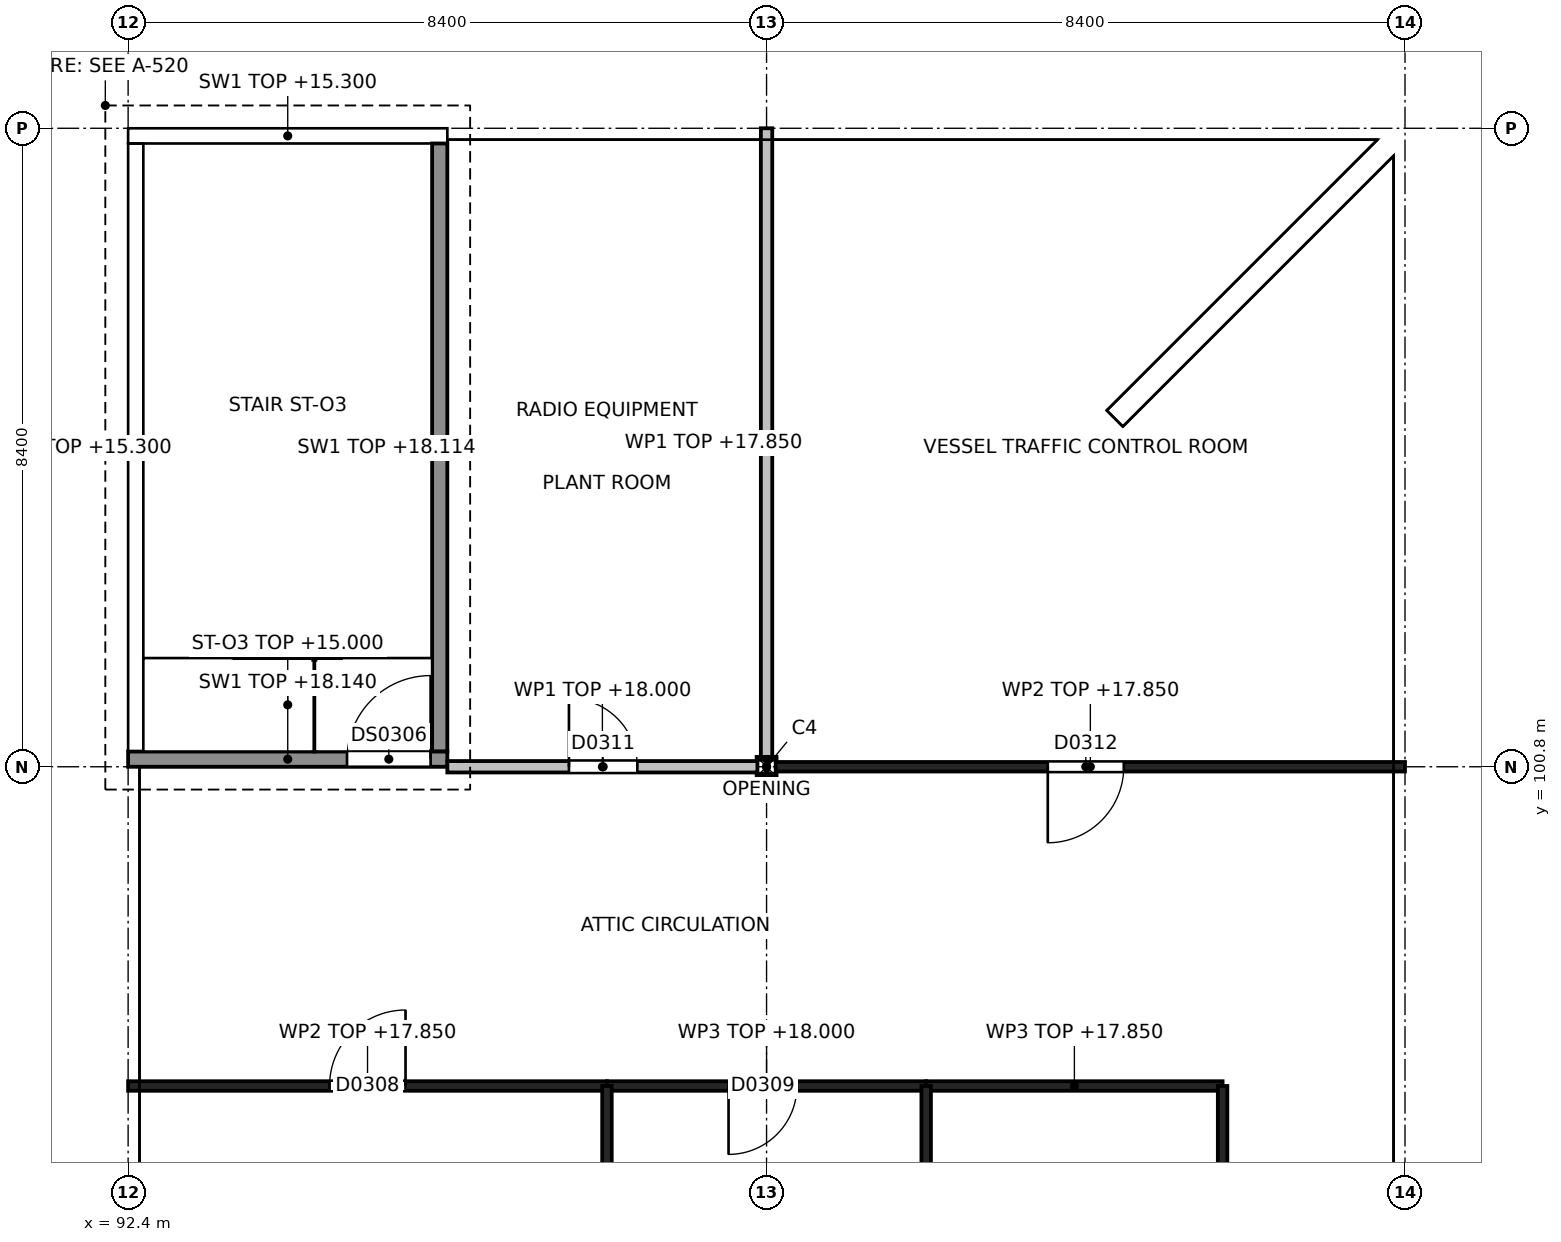
"""IFC4 building model, lengths in metres.
Left out: names, types, materials, properties, quantities, classifications, styles, units other than length and angle.
Written with IfcOpenShell. Run it as: python <this file> out.ifc"""

import sys

from ifc_helpers import new_model, si_unit, direction, frame, frame_2d, origin, origin_2d, place, context, subcontext, project, spatial, polyline, rectangle, i_section, outline, extrude, element, fill, save


model = new_model("IFC4")
c1 = context("Model", 3, precision=1e-05, world=origin(), true_north=direction((0.0, 1.0)))
c2 = subcontext(c1, "Body", "Model", "MODEL_VIEW")
j1 = project(units=[si_unit("LENGTHUNIT", "METRE"), si_unit("PLANEANGLEUNIT", "RADIAN")], contexts=[c1])
p1 = place(None, origin())
s1 = spatial("IfcSite", under=j1, at=p1, CompositionType="ELEMENT")
p2 = place(p1, origin())
s2 = spatial("IfcBuilding", under=s1, at=p2, CompositionType="ELEMENT")
p3 = place(p2, frame((0.0, 0.0, 15.0)))
s3 = spatial("IfcBuildingStorey", under=s2, at=p3, CompositionType="ELEMENT", Elevation=15.0)
p4 = place(p3, frame((100.8, 100.8, 0.0), z_axis=(0.0, 0.0, 1.0), x_axis=(1.0, 0.0, 0.0)))
e1 = element("IfcColumn", 1, at=p4, inside=s3, PredefinedType="COLUMN", context=c2, shape_type="SweptSolid", body=[
    extrude(i_section(OverallWidth=0.24, OverallDepth=0.24, WebThickness=0.01, FlangeThickness=0.017, at=origin_2d()), origin(), (0.0, 0.0, 1.0), 3.31),
])
p5 = place(p3, frame((92.4, 100.9, 0.0), z_axis=(0.0, 0.0, 1.0), x_axis=(1.0, 0.0, 0.0)))
e2 = element("IfcWall", 2, at=p5, inside=s3, PredefinedType="SHEAR", context=c2, shape_type="SweptSolid", body=[
    extrude(outline(polyline([(0.0, 0.0), (4.2, 0.0), (4.2, 3.14), (3.953, 2.755), (3.706, 2.755), (3.459, 2.917), (0.247, 0.393), (0.0, 0.3), (0.0, 0.0)])), frame((0.0, 0.1, 0.0), z_axis=(0.0, -1.0, 0.0), x_axis=(1.0, 0.0, 0.0)), (0.0, 0.0, 1.0), 0.2),
])
p6 = place(p5, frame((2.88, 0.0, 0.0)))
e3 = element("IfcOpeningElement", 3, at=p6, cuts=e2, PredefinedType="OPENING", context=c2, shape_type="SweptSolid", body=[
    extrude(rectangle(XDim=1.1, YDim=2.1, at=frame_2d((0.55, 1.05))), frame((0.0, 0.1, 0.0), z_axis=(0.0, -1.0, 0.0), x_axis=(1.0, 0.0, 0.0)), (0.0, 0.0, 1.0), 0.2),
])
p7 = place(p3, frame((92.4, 109.1, 0.0), z_axis=(0.0, 0.0, 1.0), x_axis=(1.0, 0.0, 0.0)))
e4 = element("IfcWall", 4, at=p7, inside=s3, PredefinedType="SHEAR", context=c2, shape_type="SweptSolid", body=[
    extrude(outline(polyline([(0.0, 0.0), (4.2, 0.0), (4.2, 0.3), (0.0, 0.3), (0.0, 0.0)])), frame((0.0, 0.1, 0.0), z_axis=(0.0, -1.0, 0.0), x_axis=(1.0, 0.0, 0.0)), (0.0, 0.0, 1.0), 0.2),
])
p8 = place(p3, frame((92.5, 101.0, 0.0), z_axis=(0.0, 0.0, 1.0), x_axis=(0.0, 1.0, 0.0)))
e5 = element("IfcWall", 5, at=p8, inside=s3, PredefinedType="SHEAR", context=c2, shape_type="SweptSolid", body=[
    extrude(outline(polyline([(0.0, 0.0), (8.0, 0.0), (8.0, 0.3), (0.0, 0.3), (0.0, 0.0)])), frame((0.0, 0.1, 0.0), z_axis=(0.0, -1.0, 0.0), x_axis=(1.0, 0.0, 0.0)), (0.0, 0.0, 1.0), 0.2),
])
p9 = place(p3, frame((96.5, 101.0, 0.0), z_axis=(0.0, 0.0, 1.0), x_axis=(0.0, 1.0, 0.0)))
e6 = element("IfcWall", 6, at=p9, inside=s3, PredefinedType="SHEAR", context=c2, shape_type="SweptSolid", body=[
    extrude(outline(polyline([(0.0, 0.0), (8.0, 0.0), (8.0, 0.356), (4.75, 2.91), (4.5, 2.755), (4.25, 2.755), (4.0, 2.792), (3.75, 3.114), (0.0, 3.114), (0.0, 0.0)])), frame((0.0, 0.1, 0.0), z_axis=(0.0, -1.0, 0.0), x_axis=(1.0, 0.0, 0.0)), (0.0, 0.0, 1.0), 0.2),
])
p10 = place(p3, frame((92.4, 96.6, 0.0), z_axis=(0.0, 0.0, 1.0), x_axis=(1.0, 0.0, 0.0)))
e7 = element("IfcWall", 7, at=p10, inside=s3, PredefinedType="PARTITIONING", context=c2, shape_type="SweptSolid", body=[
    extrude(rectangle(XDim=6.3, YDim=0.125, at=frame_2d((3.15, 0.0))), origin(), (0.0, 0.0, 1.0), 2.85),
])
p11 = place(p10, frame((2.65, 0.0, 0.0)))
e8 = element("IfcOpeningElement", 8, at=p11, cuts=e7, PredefinedType="OPENING", context=c2, shape_type="SweptSolid", body=[
    extrude(rectangle(XDim=1.0, YDim=2.2, at=frame_2d((0.5, 1.1))), frame((0.0, 0.062, 0.0), z_axis=(0.0, -1.0, 0.0), x_axis=(1.0, 0.0, 0.0)), (0.0, 0.0, 1.0), 0.125),
])
p12 = place(p3, frame((98.7, 96.6, 0.0), z_axis=(0.0, 0.0, 1.0), x_axis=(1.0, 0.0, 0.0)))
e9 = element("IfcWall", 9, at=p12, inside=s3, PredefinedType="PARTITIONING", context=c2, shape_type="SweptSolid", body=[
    extrude(rectangle(XDim=4.2, YDim=0.125, at=frame_2d((2.1, 0.0))), origin(), (0.0, 0.0, 1.0), 3.0),
])
p13 = place(p12, frame((1.6, 0.0, 0.0)))
e10 = element("IfcOpeningElement", 10, at=p13, cuts=e9, PredefinedType="OPENING", context=c2, shape_type="SweptSolid", body=[
    extrude(rectangle(XDim=0.9, YDim=2.1, at=frame_2d((0.45, 1.05))), frame((0.0, 0.062, 0.0), z_axis=(0.0, -1.0, 0.0), x_axis=(1.0, 0.0, 0.0)), (0.0, 0.0, 1.0), 0.125),
])
p14 = place(p3, frame((102.9, 96.6, 0.0), z_axis=(0.0, 0.0, 1.0), x_axis=(1.0, 0.0, 0.0)))
e11 = element("IfcWall", 11, at=p14, inside=s3, PredefinedType="PARTITIONING", context=c2, shape_type="SweptSolid", body=[
    extrude(rectangle(XDim=3.9, YDim=0.125, at=frame_2d((1.95, 0.0))), origin(), (0.0, 0.0, 1.0), 2.85),
])
p15 = place(p3, frame((106.8, 84.0, 0.0), z_axis=(0.0, 0.0, 1.0), x_axis=(0.0, 1.0, 0.0)))
e12 = element("IfcWall", 12, at=p15, inside=s3, PredefinedType="PARTITIONING", context=c2, shape_type="SweptSolid", body=[
    extrude(rectangle(XDim=12.6, YDim=0.125, at=frame_2d((6.3, 0.0))), origin(), (0.0, 0.0, 1.0), 3.0),
])
p16 = place(p15, frame((5.8, 0.0, 0.0)))
e13 = element("IfcOpeningElement", 13, at=p16, cuts=e12, PredefinedType="OPENING", context=c2, shape_type="SweptSolid", body=[
    extrude(rectangle(XDim=1.0, YDim=2.1, at=frame_2d((0.5, 1.05))), frame((0.0, 0.062, 0.0), z_axis=(0.0, -1.0, 0.0), x_axis=(1.0, 0.0, 0.0)), (0.0, 0.0, 1.0), 0.125),
])
p17 = place(p3, frame((96.6, 100.8, 0.0), z_axis=(0.0, 0.0, 1.0), x_axis=(1.0, 0.0, 0.0)))
e14 = element("IfcWall", 14, at=p17, inside=s3, PredefinedType="PARTITIONING", context=c2, shape_type="SweptSolid", body=[
    extrude(rectangle(XDim=4.08, YDim=0.15, at=frame_2d((2.04, 0.0))), origin(), (0.0, 0.0, 1.0), 3.0),
])
p18 = place(p17, frame((1.6, 0.0, 0.0)))
e15 = element("IfcOpeningElement", 15, at=p18, cuts=e14, PredefinedType="OPENING", context=c2, shape_type="SweptSolid", body=[
    extrude(rectangle(XDim=0.9, YDim=2.1, at=frame_2d((0.45, 1.05))), frame((0.0, 0.075, 0.0), z_axis=(0.0, -1.0, 0.0), x_axis=(1.0, 0.0, 0.0)), (0.0, 0.0, 1.0), 0.15),
])
p19 = place(p3, frame((100.92, 100.8, 0.0), z_axis=(0.0, 0.0, 1.0), x_axis=(1.0, 0.0, 0.0)))
e16 = element("IfcWall", 16, at=p19, inside=s3, PredefinedType="PARTITIONING", context=c2, shape_type="SweptSolid", body=[
    extrude(rectangle(XDim=8.28, YDim=0.125, at=frame_2d((4.14, 0.0))), origin(), (0.0, 0.0, 1.0), 2.85),
])
p20 = place(p19, frame((3.58, 0.0, 0.0)))
e17 = element("IfcOpeningElement", 17, at=p20, cuts=e16, PredefinedType="OPENING", context=c2, shape_type="SweptSolid", body=[
    extrude(rectangle(XDim=1.0, YDim=2.2, at=frame_2d((0.5, 1.1))), frame((0.0, 0.062, 0.0), z_axis=(0.0, -1.0, 0.0), x_axis=(1.0, 0.0, 0.0)), (0.0, 0.0, 1.0), 0.125),
])
for number, where, z_axis, x_axis in (
    (18, (98.7, 84.0, 0.0), (0.0, 0.0, 1.0), (0.0, 1.0, 0.0)),
    (19, (102.9, 84.0, 0.0), (0.0, 0.0, 1.0), (0.0, 1.0, 0.0)),
):
    element("IfcWall", number, at=place(p3, frame(where, z_axis=z_axis, x_axis=x_axis)), inside=s3, PredefinedType="PARTITIONING", context=c2, shape_type="SweptSolid", body=[
        extrude(rectangle(XDim=12.6, YDim=0.125, at=frame_2d((6.3, 0.0))), origin(), (0.0, 0.0, 1.0), 3.0),
    ])
p21 = place(p3, frame((100.8, 100.92, 0.0), z_axis=(0.0, 0.0, 1.0), x_axis=(0.0, 1.0, 0.0)))
e20 = element("IfcWall", 20, at=p21, inside=s3, PredefinedType="PARTITIONING", context=c2, shape_type="SweptSolid", body=[
    extrude(rectangle(XDim=8.28, YDim=0.15, at=frame_2d((4.14, 0.0))), origin(), (0.0, 0.0, 1.0), 2.85),
])
p22 = place(p11, origin())
e21 = element("IfcDoor", 21, at=p22, inside=s3, OperationType="SINGLE_SWING_RIGHT", PredefinedType="DOOR", context=c2, shape_type="SweptSolid", body=[
    extrude(rectangle(XDim=1.0, YDim=2.2, at=frame_2d((0.5, 1.1))), frame((0.0, 0.025, 0.0), z_axis=(0.0, -1.0, 0.0), x_axis=(1.0, 0.0, 0.0)), (0.0, 0.0, 1.0), 0.05),
])
fill(e8, e21)
p23 = place(p13, origin())
e22 = element("IfcDoor", 22, at=p23, inside=s3, OperationType="SINGLE_SWING_LEFT", PredefinedType="DOOR", context=c2, shape_type="SweptSolid", body=[
    extrude(rectangle(XDim=0.9, YDim=2.1, at=frame_2d((0.45, 1.05))), frame((0.0, 0.025, 0.0), z_axis=(0.0, -1.0, 0.0), x_axis=(1.0, 0.0, 0.0)), (0.0, 0.0, 1.0), 0.05),
])
fill(e10, e22)
p24 = place(p18, origin())
e23 = element("IfcDoor", 23, at=p24, inside=s3, OperationType="SINGLE_SWING_LEFT", PredefinedType="DOOR", context=c2, shape_type="SweptSolid", body=[
    extrude(rectangle(XDim=0.9, YDim=2.1, at=frame_2d((0.45, 1.05))), frame((0.0, 0.025, 0.0), z_axis=(0.0, -1.0, 0.0), x_axis=(1.0, 0.0, 0.0)), (0.0, 0.0, 1.0), 0.05),
])
fill(e15, e23)
p25 = place(p20, origin())
e24 = element("IfcDoor", 24, at=p25, inside=s3, OperationType="SINGLE_SWING_LEFT", PredefinedType="DOOR", context=c2, shape_type="SweptSolid", body=[
    extrude(rectangle(XDim=1.0, YDim=2.2, at=frame_2d((0.5, 1.1))), frame((0.0, 0.025, 0.0), z_axis=(0.0, -1.0, 0.0), x_axis=(1.0, 0.0, 0.0)), (0.0, 0.0, 1.0), 0.05),
])
fill(e17, e24)
p26 = place(p6, origin())
e25 = element("IfcDoor", 25, at=p26, inside=s3, OperationType="SINGLE_SWING_RIGHT", PredefinedType="DOOR", context=c2, shape_type="SweptSolid", body=[
    extrude(rectangle(XDim=1.1, YDim=2.1, at=frame_2d((0.55, 1.05))), frame((0.0, 0.025, 0.0), z_axis=(0.0, -1.0, 0.0), x_axis=(1.0, 0.0, 0.0)), (0.0, 0.0, 1.0), 0.05),
])
fill(e3, e25)
save(model, sys.argv[1])
